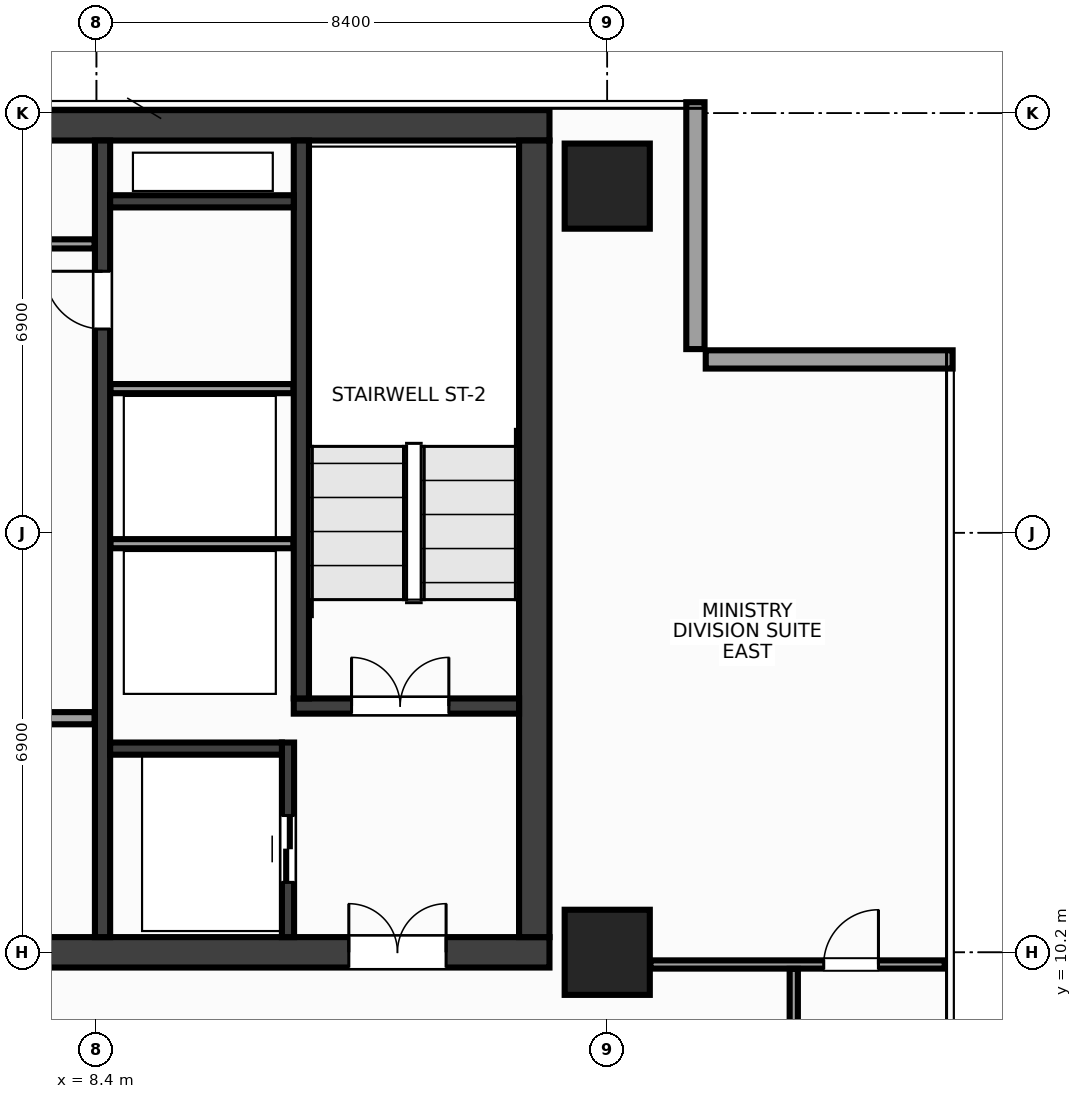
"""IFC4 building model, lengths in metres.
Left out: names, types, materials, properties, quantities, classifications, styles, units other than length and angle.
Written with IfcOpenShell. Run it as: python <this file> out.ifc"""

import sys

from ifc_helpers import new_model, si_unit, direction, frame, frame_2d, origin, origin_2d, place, context, subcontext, project, spatial, rectangle, extrude, source, transform, mapped, element, fill, save


model = new_model("IFC4")
c1 = context("Model", 3, precision=1e-05, world=origin(), true_north=direction((0.0, 1.0)))
c2 = subcontext(c1, "Body", "Model", "MODEL_VIEW")
j1 = project(units=[si_unit("LENGTHUNIT", "METRE"), si_unit("PLANEANGLEUNIT", "RADIAN")], contexts=[c1])
p1 = place(None, origin())
s1 = spatial("IfcSite", under=j1, at=p1, CompositionType="ELEMENT")
p2 = place(p1, origin())
s2 = spatial("IfcBuilding", under=s1, at=p2, CompositionType="ELEMENT")
p3 = place(p2, frame((0.0, 0.0, 236.0)))
s3 = spatial("IfcBuildingStorey", under=s2, at=p3, CompositionType="ELEMENT", Elevation=236.0)
m1 = source(origin(), c2, "Body", "SweptSolid", [
    extrude(rectangle(XDim=31.7, YDim=0.5, at=frame_2d((15.85, 0.0))), origin(), (0.0, 0.0, 1.0), 3.6),
])
p4 = place(p3, frame((-15.85, 23.8, 0.0), z_axis=(0.0, 0.0, 1.0), x_axis=(1.0, 0.0, 0.0)))
e1 = element("IfcWall", 1, at=p4, inside=s3, PredefinedType="SHEAR", context=c2, shape_type="MappedRepresentation", body=[
    mapped(m1, transform((0.0, 0.0, 0.0), x_axis=(1.0, 0.0, 0.0), y_axis=(0.0, 1.0, 0.0), z_axis=(0.0, 0.0, 1.0), scale=1.0)),
])
p5 = place(p3, frame((-15.85, 10.2, 0.0), z_axis=(0.0, 0.0, 1.0), x_axis=(1.0, 0.0, 0.0)))
e2 = element("IfcWall", 2, at=p5, inside=s3, PredefinedType="SHEAR", context=c2, shape_type="MappedRepresentation", body=[
    mapped(m1, transform((0.0, 0.0, 0.0), x_axis=(1.0, 0.0, 0.0), y_axis=(0.0, 1.0, 0.0), z_axis=(0.0, 0.0, 1.0), scale=1.0)),
])
p6 = place(p5, frame((1.7, 0.0, 0.0)))
e3 = element("IfcOpeningElement", 3, at=p6, cuts=e2, PredefinedType="OPENING", context=c2, shape_type="SweptSolid", body=[
    extrude(rectangle(XDim=1.6, YDim=2.15, at=frame_2d((0.8, 1.075))), frame((0.0, 0.262, 0.0), z_axis=(0.0, -1.0, 0.0), x_axis=(1.0, 0.0, 0.0)), (0.0, 0.0, 1.0), 0.524),
])
p7 = place(p5, frame((28.4, 0.0, 0.0)))
e4 = element("IfcOpeningElement", 4, at=p7, cuts=e2, PredefinedType="OPENING", context=c2, shape_type="SweptSolid", body=[
    extrude(rectangle(XDim=1.6, YDim=2.15, at=frame_2d((0.8, 1.075))), frame((0.0, 0.262, 0.0), z_axis=(0.0, -1.0, 0.0), x_axis=(1.0, 0.0, 0.0)), (0.0, 0.0, 1.0), 0.524),
])
p8 = place(p5, frame((15.1, 0.0, 0.0)))
e5 = element("IfcOpeningElement", 5, at=p8, cuts=e2, PredefinedType="OPENING", context=c2, shape_type="SweptSolid", body=[
    extrude(rectangle(XDim=1.5, YDim=2.2, at=frame_2d((0.75, 1.1))), frame((0.0, 0.262, 0.0), z_axis=(0.0, -1.0, 0.0), x_axis=(1.0, 0.0, 0.0)), (0.0, 0.0, 1.0), 0.524),
])
m2 = source(origin(), c2, "Body", "SweptSolid", [
    extrude(rectangle(XDim=13.1, YDim=0.5, at=frame_2d((6.55, 0.0))), origin(), (0.0, 0.0, 1.0), 3.6),
])
p9 = place(p3, frame((15.6, 10.45, 0.0), z_axis=(0.0, 0.0, 1.0), x_axis=(0.0, 1.0, 0.0)))
e6 = element("IfcWall", 6, at=p9, inside=s3, PredefinedType="SHEAR", context=c2, shape_type="MappedRepresentation", body=[
    mapped(m2, transform((0.0, 0.0, 0.0), x_axis=(1.0, 0.0, 0.0), y_axis=(0.0, 1.0, 0.0), z_axis=(0.0, 0.0, 1.0), scale=1.0)),
])
m3 = source(origin(), c2, "Body", "SweptSolid", [
    extrude(rectangle(XDim=13.1, YDim=0.25, at=frame_2d((6.55, 0.0))), origin(), (0.0, 0.0, 1.0), 3.6),
])
p10 = place(p3, frame((8.5, 10.45, 0.0), z_axis=(0.0, 0.0, 1.0), x_axis=(0.0, 1.0, 0.0)))
e7 = element("IfcWall", 7, at=p10, inside=s3, PredefinedType="SHEAR", context=c2, shape_type="MappedRepresentation", body=[
    mapped(m3, transform((0.0, 0.0, 0.0), x_axis=(1.0, 0.0, 0.0), y_axis=(0.0, 1.0, 0.0), z_axis=(0.0, 0.0, 1.0), scale=1.0)),
])
p11 = place(p10, frame((10.0, 0.0, 0.0)))
e8 = element("IfcOpeningElement", 8, at=p11, cuts=e7, PredefinedType="OPENING", context=c2, shape_type="SweptSolid", body=[
    extrude(rectangle(XDim=0.95, YDim=2.15, at=frame_2d((0.475, 1.075))), frame((0.0, 0.137, 0.0), z_axis=(0.0, -1.0, 0.0), x_axis=(1.0, 0.0, 0.0)), (0.0, 0.0, 1.0), 0.274),
])
m4 = source(origin(), c2, "Body", "SweptSolid", [
    extrude(rectangle(XDim=3.705, YDim=0.25, at=frame_2d((1.853, 0.0))), origin(), (0.0, 0.0, 1.0), 3.6),
])
p12 = place(p3, frame((11.645, 14.25, 0.0), z_axis=(0.0, 0.0, 1.0), x_axis=(1.0, 0.0, 0.0)))
e9 = element("IfcWall", 9, at=p12, inside=s3, PredefinedType="SHEAR", context=c2, shape_type="MappedRepresentation", body=[
    mapped(m4, transform((0.0, 0.0, 0.0), x_axis=(1.0, 0.0, 0.0), y_axis=(0.0, 1.0, 0.0), z_axis=(0.0, 0.0, 1.0), scale=1.0)),
])
p13 = place(p12, frame((0.95, 0.0, 0.0)))
e10 = element("IfcOpeningElement", 10, at=p13, cuts=e9, PredefinedType="OPENING", context=c2, shape_type="SweptSolid", body=[
    extrude(rectangle(XDim=1.6, YDim=2.15, at=frame_2d((0.8, 1.075))), frame((0.0, 0.137, 0.0), z_axis=(0.0, -1.0, 0.0), x_axis=(1.0, 0.0, 0.0)), (0.0, 0.0, 1.0), 0.274),
])
m5 = source(origin(), c2, "Body", "SweptSolid", [
    extrude(rectangle(XDim=9.175, YDim=0.25, at=frame_2d((4.587, 0.0))), origin(), (0.0, 0.0, 1.0), 3.6),
])
p14 = place(p3, frame((11.77, 14.375, 0.0), z_axis=(0.0, 0.0, 1.0), x_axis=(0.0, 1.0, 0.0)))
e11 = element("IfcWall", 11, at=p14, inside=s3, PredefinedType="SHEAR", context=c2, shape_type="MappedRepresentation", body=[
    mapped(m5, transform((0.0, 0.0, 0.0), x_axis=(1.0, 0.0, 0.0), y_axis=(0.0, 1.0, 0.0), z_axis=(0.0, 0.0, 1.0), scale=1.0)),
])
m6 = source(origin(), c2, "Body", "SweptSolid", [
    extrude(rectangle(XDim=3.2, YDim=0.2, at=frame_2d((1.6, 0.0))), origin(), (0.0, 0.0, 1.0), 3.6),
])
p15 = place(p3, frame((11.55, 10.45, 0.0), z_axis=(0.0, 0.0, 1.0), x_axis=(0.0, 1.0, 0.0)))
e12 = element("IfcWall", 12, at=p15, inside=s3, PredefinedType="SHEAR", context=c2, shape_type="MappedRepresentation", body=[
    mapped(m6, transform((0.0, 0.0, 0.0), x_axis=(1.0, 0.0, 0.0), y_axis=(0.0, 1.0, 0.0), z_axis=(0.0, 0.0, 1.0), scale=1.0)),
])
p16 = place(p15, frame((0.9, 0.0, 0.0)))
e13 = element("IfcOpeningElement", 13, at=p16, cuts=e12, PredefinedType="OPENING", context=c2, shape_type="SweptSolid", body=[
    extrude(rectangle(XDim=1.1, YDim=2.15, at=frame_2d((0.55, 1.075))), frame((0.0, 0.112, 0.0), z_axis=(0.0, -1.0, 0.0), x_axis=(1.0, 0.0, 0.0)), (0.0, 0.0, 1.0), 0.224),
])
m7 = source(origin(), c2, "Body", "SweptSolid", [
    extrude(rectangle(XDim=2.825, YDim=0.2, at=frame_2d((1.413, 0.0))), origin(), (0.0, 0.0, 1.0), 3.6),
])
p17 = place(p3, frame((8.625, 13.55, 0.0), z_axis=(0.0, 0.0, 1.0), x_axis=(1.0, 0.0, 0.0)))
e14 = element("IfcWall", 14, at=p17, inside=s3, PredefinedType="SHEAR", context=c2, shape_type="MappedRepresentation", body=[
    mapped(m7, transform((0.0, 0.0, 0.0), x_axis=(1.0, 0.0, 0.0), y_axis=(0.0, 1.0, 0.0), z_axis=(0.0, 0.0, 1.0), scale=1.0)),
])
m8 = source(origin(), c2, "Body", "SweptSolid", [
    extrude(rectangle(XDim=3.02, YDim=0.2, at=frame_2d((1.51, 0.0))), origin(), (0.0, 0.0, 1.0), 3.6),
])
p18 = place(p3, frame((8.625, 22.55, 0.0), z_axis=(0.0, 0.0, 1.0), x_axis=(1.0, 0.0, 0.0)))
e15 = element("IfcWall", 15, at=p18, inside=s3, PredefinedType="SHEAR", context=c2, shape_type="MappedRepresentation", body=[
    mapped(m8, transform((0.0, 0.0, 0.0), x_axis=(1.0, 0.0, 0.0), y_axis=(0.0, 1.0, 0.0), z_axis=(0.0, 0.0, 1.0), scale=1.0)),
])
m9 = source(origin(), c2, "Body", "SweptSolid", [
    extrude(rectangle(XDim=1.4, YDim=1.4, at=origin_2d()), origin(), (0.0, 0.0, 1.0), 3.6),
])
for number, where, z_axis, x_axis in (
    (16, (16.8, 10.2, 0.0), (0.0, 0.0, 1.0), (1.0, 0.0, 0.0)),
    (17, (16.8, 22.8, 0.0), (0.0, 0.0, 1.0), (1.0, 0.0, 0.0)),
):
    element("IfcColumn", number, at=place(p3, frame(where, z_axis=z_axis, x_axis=x_axis)), inside=s3, PredefinedType="COLUMN", context=c2, shape_type="MappedRepresentation", body=[
        mapped(m9, transform((0.0, 0.0, 0.0), x_axis=(1.0, 0.0, 0.0), y_axis=(0.0, 1.0, 0.0), z_axis=(0.0, 0.0, 1.0), scale=1.0)),
    ])
m10 = source(origin(), c2, "Body", "SweptSolid", [
    extrude(rectangle(XDim=4.06, YDim=0.3, at=frame_2d((2.03, 0.0))), origin(), (0.0, 0.0, 1.0), 2.75),
])
p19 = place(p3, frame((22.48, 19.95, 0.0), z_axis=(0.0, 0.0, 1.0), x_axis=(-1.0, 0.0, 0.0)))
e18 = element("IfcWall", 18, at=p19, inside=s3, PredefinedType="STANDARD", context=c2, shape_type="MappedRepresentation", body=[
    mapped(m10, transform((0.0, 0.0, 0.0), x_axis=(1.0, 0.0, 0.0), y_axis=(0.0, 1.0, 0.0), z_axis=(0.0, 0.0, 1.0), scale=1.0)),
])
m11 = source(origin(), c2, "Body", "SweptSolid", [
    extrude(rectangle(XDim=4.06, YDim=0.3, at=frame_2d((2.03, 0.0))), origin(), (0.0, 0.0, 1.0), 2.75),
])
p20 = place(p3, frame((18.25, 20.12, 0.0), z_axis=(0.0, 0.0, 1.0), x_axis=(0.0, 1.0, 0.0)))
e19 = element("IfcWall", 19, at=p20, inside=s3, PredefinedType="STANDARD", context=c2, shape_type="MappedRepresentation", body=[
    mapped(m11, transform((0.0, 0.0, 0.0), x_axis=(1.0, 0.0, 0.0), y_axis=(0.0, 1.0, 0.0), z_axis=(0.0, 0.0, 1.0), scale=1.0)),
])
m12 = source(origin(), c2, "Body", "SweptSolid", [
    extrude(rectangle(XDim=3.01, YDim=0.15, at=frame_2d((1.505, 0.0))), origin(), (0.0, 0.0, 1.0), 3.37),
])
for number, where, z_axis, x_axis in (
    (20, (8.63, 16.92, 0.0), (0.0, 0.0, 1.0), (1.0, 0.0, 0.0)),
    (21, (8.63, 19.47, 0.0), (0.0, 0.0, 1.0), (1.0, 0.0, 0.0)),
):
    element("IfcWall", number, at=place(p3, frame(where, z_axis=z_axis, x_axis=x_axis)), inside=s3, PredefinedType="PARTITIONING", context=c2, shape_type="MappedRepresentation", body=[
        mapped(m12, transform((0.0, 0.0, 0.0), x_axis=(1.0, 0.0, 0.0), y_axis=(0.0, 1.0, 0.0), z_axis=(0.0, 0.0, 1.0), scale=1.0)),
    ])
m13 = source(origin(), c2, "Body", "SweptSolid", [
    extrude(rectangle(XDim=7.07, YDim=0.2, at=frame_2d((3.535, 0.0))), origin(), (0.0, 0.0, 1.0), 3.37),
])
p21 = place(p3, frame((1.3, 14.05, 0.0), z_axis=(0.0, 0.0, 1.0), x_axis=(1.0, 0.0, 0.0)))
e22 = element("IfcWall", 22, at=p21, inside=s3, PredefinedType="PARTITIONING", context=c2, shape_type="MappedRepresentation", body=[
    mapped(m13, transform((0.0, 0.0, 0.0), x_axis=(1.0, 0.0, 0.0), y_axis=(0.0, 1.0, 0.0), z_axis=(0.0, 0.0, 1.0), scale=1.0)),
])
p22 = place(p21, frame((2.8, 0.0, 0.0)))
e23 = element("IfcOpeningElement", 23, at=p22, cuts=e22, PredefinedType="OPENING", context=c2, shape_type="SweptSolid", body=[
    extrude(rectangle(XDim=0.98, YDim=2.15, at=frame_2d((0.49, 1.075))), frame((0.0, 0.112, 0.0), z_axis=(0.0, -1.0, 0.0), x_axis=(1.0, 0.0, 0.0)), (0.0, 0.0, 1.0), 0.224),
])
m14 = source(origin(), c2, "Body", "SweptSolid", [
    extrude(rectangle(XDim=2.07, YDim=0.15, at=frame_2d((1.035, 0.0))), origin(), (0.0, 0.0, 1.0), 3.37),
])
p23 = place(p3, frame((6.3, 21.85, 0.0), z_axis=(0.0, 0.0, 1.0), x_axis=(1.0, 0.0, 0.0)))
e24 = element("IfcWall", 24, at=p23, inside=s3, PredefinedType="PARTITIONING", context=c2, shape_type="MappedRepresentation", body=[
    mapped(m14, transform((0.0, 0.0, 0.0), x_axis=(1.0, 0.0, 0.0), y_axis=(0.0, 1.0, 0.0), z_axis=(0.0, 0.0, 1.0), scale=1.0)),
])
m15 = source(origin(), c2, "Body", "SweptSolid", [
    extrude(rectangle(XDim=4.84, YDim=0.135, at=frame_2d((2.42, 0.0))), origin(), (0.0, 0.0, 1.0), 3.37),
])
p24 = place(p3, frame((17.51, 10.0, 0.0), z_axis=(0.0, 0.0, 1.0), x_axis=(1.0, 0.0, 0.0)))
e25 = element("IfcWall", 25, at=p24, inside=s3, PredefinedType="PARTITIONING", context=c2, shape_type="MappedRepresentation", body=[
    mapped(m15, transform((0.0, 0.0, 0.0), x_axis=(1.0, 0.0, 0.0), y_axis=(0.0, 1.0, 0.0), z_axis=(0.0, 0.0, 1.0), scale=1.0)),
])
p25 = place(p24, frame((2.85, 0.0, 0.0)))
e26 = element("IfcOpeningElement", 26, at=p25, cuts=e25, PredefinedType="OPENING", context=c2, shape_type="SweptSolid", body=[
    extrude(rectangle(XDim=0.9, YDim=2.15, at=frame_2d((0.45, 1.075))), frame((0.0, 0.08, 0.0), z_axis=(0.0, -1.0, 0.0), x_axis=(1.0, 0.0, 0.0)), (0.0, 0.0, 1.0), 0.159),
])
m16 = source(origin(), c2, "Body", "SweptSolid", [
    extrude(rectangle(XDim=2.123, YDim=0.135, at=frame_2d((1.061, 0.0))), origin(), (0.0, 0.0, 1.0), 3.37),
])
p26 = place(p3, frame((19.867, 7.805, 0.0), z_axis=(0.0, 0.0, 1.0), x_axis=(0.0, 1.0, 0.0)))
e27 = element("IfcWall", 27, at=p26, inside=s3, PredefinedType="PARTITIONING", context=c2, shape_type="MappedRepresentation", body=[
    mapped(m16, transform((0.0, 0.0, 0.0), x_axis=(1.0, 0.0, 0.0), y_axis=(0.0, 1.0, 0.0), z_axis=(0.0, 0.0, 1.0), scale=1.0)),
])
m17 = source(origin(), c2, "Body", "SweptSolid", [
    extrude(rectangle(XDim=1.6, YDim=2.15, at=frame_2d((0.8, 1.075))), frame((0.0, 0.025, 0.0), z_axis=(0.0, -1.0, 0.0), x_axis=(1.0, 0.0, 0.0)), (0.0, 0.0, 1.0), 0.05),
])
p27 = place(p13, origin())
e28 = element("IfcDoor", 28, at=p27, inside=s3, OperationType="DOUBLE_DOOR_SINGLE_SWING", PredefinedType="DOOR", context=c2, shape_type="MappedRepresentation", body=[
    mapped(m17, transform((0.0, 0.0, 0.0), x_axis=(1.0, 0.0, 0.0), y_axis=(0.0, 1.0, 0.0), z_axis=(0.0, 0.0, 1.0), scale=1.0)),
])
fill(e10, e28)
p28 = place(p7, origin())
e29 = element("IfcDoor", 29, at=p28, inside=s3, OperationType="DOUBLE_DOOR_SINGLE_SWING", PredefinedType="DOOR", context=c2, shape_type="MappedRepresentation", body=[
    mapped(m17, transform((0.0, 0.0, 0.0), x_axis=(1.0, 0.0, 0.0), y_axis=(0.0, 1.0, 0.0), z_axis=(0.0, 0.0, 1.0), scale=1.0)),
])
fill(e4, e29)
m18 = source(origin(), c2, "Body", "SweptSolid", [
    extrude(rectangle(XDim=1.1, YDim=2.15, at=frame_2d((0.55, 1.075))), frame((0.0, 0.025, 0.0), z_axis=(0.0, -1.0, 0.0), x_axis=(1.0, 0.0, 0.0)), (0.0, 0.0, 1.0), 0.05),
])
p29 = place(p16, origin())
e30 = element("IfcDoor", 30, at=p29, inside=s3, OperationType="DOUBLE_DOOR_SLIDING", PredefinedType="DOOR", context=c2, shape_type="MappedRepresentation", body=[
    mapped(m18, transform((0.0, 0.0, 0.0), x_axis=(1.0, 0.0, 0.0), y_axis=(0.0, 1.0, 0.0), z_axis=(0.0, 0.0, 1.0), scale=1.0)),
])
fill(e13, e30)
m19 = source(origin(), c2, "Body", "SweptSolid", [
    extrude(rectangle(XDim=0.95, YDim=2.15, at=frame_2d((0.475, 1.075))), frame((0.0, 0.025, 0.0), z_axis=(0.0, -1.0, 0.0), x_axis=(1.0, 0.0, 0.0)), (0.0, 0.0, 1.0), 0.05),
])
p30 = place(p11, origin())
e31 = element("IfcDoor", 31, at=p30, inside=s3, OperationType="SINGLE_SWING_RIGHT", PredefinedType="DOOR", context=c2, shape_type="MappedRepresentation", body=[
    mapped(m19, transform((0.0, 0.0, 0.0), x_axis=(1.0, 0.0, 0.0), y_axis=(0.0, 1.0, 0.0), z_axis=(0.0, 0.0, 1.0), scale=1.0)),
])
fill(e8, e31)
m20 = source(origin(), c2, "Body", "SweptSolid", [
    extrude(rectangle(XDim=0.9, YDim=2.15, at=frame_2d((0.45, 1.075))), frame((0.0, 0.025, 0.0), z_axis=(0.0, -1.0, 0.0), x_axis=(1.0, 0.0, 0.0)), (0.0, 0.0, 1.0), 0.05),
])
p31 = place(p25, origin())
e32 = element("IfcDoor", 32, at=p31, inside=s3, OperationType="SINGLE_SWING_RIGHT", PredefinedType="DOOR", context=c2, shape_type="MappedRepresentation", body=[
    mapped(m20, transform((0.0, 0.0, 0.0), x_axis=(1.0, 0.0, 0.0), y_axis=(0.0, 1.0, 0.0), z_axis=(0.0, 0.0, 1.0), scale=1.0)),
])
fill(e26, e32)
save(model, sys.argv[1])
